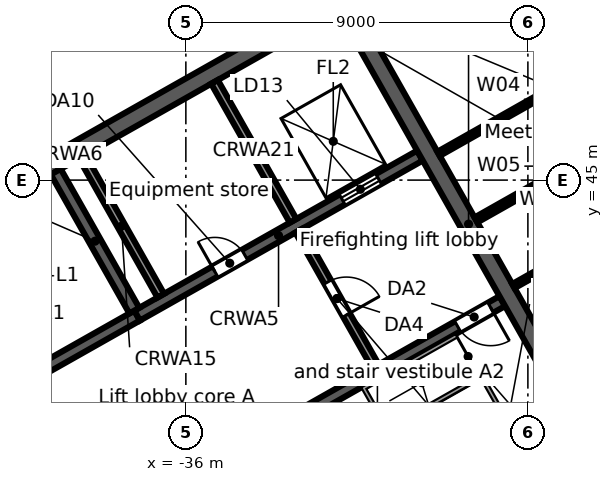
"""IFC4 building model, lengths in metres.
Left out: names, types, materials, properties, quantities, classifications, styles, units other than length and angle.
Written with IfcOpenShell. Run it as: python <this file> out.ifc"""

import sys

from ifc_helpers import new_model, si_unit, direction, frame, frame_2d, origin, place, context, subcontext, project, spatial, rectangle, extrude, element, fill, save


model = new_model("IFC4")
c1 = context("Model", 3, precision=1e-05, world=origin(), true_north=direction((0.0, 1.0)))
c2 = subcontext(c1, "Body", "Model", "MODEL_VIEW")
j1 = project(units=[si_unit("LENGTHUNIT", "METRE"), si_unit("PLANEANGLEUNIT", "RADIAN")], contexts=[c1])
p1 = place(None, origin())
s1 = spatial("IfcSite", under=j1, at=p1, CompositionType="ELEMENT")
p2 = place(p1, origin())
s2 = spatial("IfcBuilding", under=s1, at=p2, CompositionType="ELEMENT")
p3 = place(p2, frame((0.0, 0.0, 211.4)))
s3 = spatial("IfcBuildingStorey", under=s2, at=p3, CompositionType="ELEMENT", Elevation=211.4)
p4 = place(p3, frame((-0.046, 47.974, 0.0), z_axis=(0.0, 0.0, 1.0), x_axis=(-0.870356579543, -0.492421998337, 0.0)))
e1 = element("IfcWall", 1, at=p4, inside=s3, PredefinedType="STANDARD", context=c2, shape_type="SweptSolid", body=[
    extrude(rectangle(XDim=43.754, YDim=0.25, at=frame_2d((21.877, 0.0))), origin(), (0.0, 0.0, 1.0), 3.62),
])
p5 = place(p4, frame((41.061, 0.0, 0.8)))
e2 = element("IfcOpeningElement", 2, at=p5, cuts=e1, PredefinedType="OPENING", context=c2, shape_type="SweptSolid", body=[
    extrude(rectangle(XDim=2.4, YDim=2.2, at=frame_2d((1.2, 1.1))), frame((0.0, 0.135, 0.0), z_axis=(0.0, -1.0, 0.0), x_axis=(1.0, 0.0, 0.0)), (0.0, 0.0, 1.0), 0.27),
])
p6 = place(p4, frame((38.443, 0.0, 0.0)))
e3 = element("IfcOpeningElement", 3, at=p6, cuts=e1, PredefinedType="OPENING", context=c2, shape_type="SweptSolid", body=[
    extrude(rectangle(XDim=1.8, YDim=2.4, at=frame_2d((0.9, 1.2))), frame((0.0, 0.135, 0.0), z_axis=(0.0, -1.0, 0.0), x_axis=(1.0, 0.0, 0.0)), (0.0, 0.0, 1.0), 0.27),
])
p7 = place(p4, frame((35.225, 0.0, 0.8)))
e4 = element("IfcOpeningElement", 4, at=p7, cuts=e1, PredefinedType="OPENING", context=c2, shape_type="SweptSolid", body=[
    extrude(rectangle(XDim=2.4, YDim=2.2, at=frame_2d((1.2, 1.1))), frame((0.0, 0.135, 0.0), z_axis=(0.0, -1.0, 0.0), x_axis=(1.0, 0.0, 0.0)), (0.0, 0.0, 1.0), 0.27),
])
p8 = place(p4, frame((32.307, 0.0, 0.8)))
e5 = element("IfcOpeningElement", 5, at=p8, cuts=e1, PredefinedType="OPENING", context=c2, shape_type="SweptSolid", body=[
    extrude(rectangle(XDim=2.4, YDim=2.2, at=frame_2d((1.2, 1.1))), frame((0.0, 0.135, 0.0), z_axis=(0.0, -1.0, 0.0), x_axis=(1.0, 0.0, 0.0)), (0.0, 0.0, 1.0), 0.27),
])
p9 = place(p4, frame((29.688, 0.0, 0.0)))
e6 = element("IfcOpeningElement", 6, at=p9, cuts=e1, PredefinedType="OPENING", context=c2, shape_type="SweptSolid", body=[
    extrude(rectangle(XDim=1.8, YDim=2.4, at=frame_2d((0.9, 1.2))), frame((0.0, 0.135, 0.0), z_axis=(0.0, -1.0, 0.0), x_axis=(1.0, 0.0, 0.0)), (0.0, 0.0, 1.0), 0.27),
])
p10 = place(p4, frame((26.47, 0.0, 0.8)))
e7 = element("IfcOpeningElement", 7, at=p10, cuts=e1, PredefinedType="OPENING", context=c2, shape_type="SweptSolid", body=[
    extrude(rectangle(XDim=2.4, YDim=2.2, at=frame_2d((1.2, 1.1))), frame((0.0, 0.135, 0.0), z_axis=(0.0, -1.0, 0.0), x_axis=(1.0, 0.0, 0.0)), (0.0, 0.0, 1.0), 0.27),
])
p11 = place(p4, frame((23.552, 0.0, 0.8)))
e8 = element("IfcOpeningElement", 8, at=p11, cuts=e1, PredefinedType="OPENING", context=c2, shape_type="SweptSolid", body=[
    extrude(rectangle(XDim=2.4, YDim=2.2, at=frame_2d((1.2, 1.1))), frame((0.0, 0.135, 0.0), z_axis=(0.0, -1.0, 0.0), x_axis=(1.0, 0.0, 0.0)), (0.0, 0.0, 1.0), 0.27),
])
p12 = place(p4, frame((20.934, 0.0, 0.0)))
e9 = element("IfcOpeningElement", 9, at=p12, cuts=e1, PredefinedType="OPENING", context=c2, shape_type="SweptSolid", body=[
    extrude(rectangle(XDim=1.8, YDim=2.4, at=frame_2d((0.9, 1.2))), frame((0.0, 0.135, 0.0), z_axis=(0.0, -1.0, 0.0), x_axis=(1.0, 0.0, 0.0)), (0.0, 0.0, 1.0), 0.27),
])
p13 = place(p4, frame((17.716, 0.0, 0.8)))
e10 = element("IfcOpeningElement", 10, at=p13, cuts=e1, PredefinedType="OPENING", context=c2, shape_type="SweptSolid", body=[
    extrude(rectangle(XDim=2.4, YDim=2.2, at=frame_2d((1.2, 1.1))), frame((0.0, 0.135, 0.0), z_axis=(0.0, -1.0, 0.0), x_axis=(1.0, 0.0, 0.0)), (0.0, 0.0, 1.0), 0.27),
])
p14 = place(p4, frame((14.798, 0.0, 0.8)))
e11 = element("IfcOpeningElement", 11, at=p14, cuts=e1, PredefinedType="OPENING", context=c2, shape_type="SweptSolid", body=[
    extrude(rectangle(XDim=2.4, YDim=2.2, at=frame_2d((1.2, 1.1))), frame((0.0, 0.135, 0.0), z_axis=(0.0, -1.0, 0.0), x_axis=(1.0, 0.0, 0.0)), (0.0, 0.0, 1.0), 0.27),
])
p15 = place(p4, frame((12.179, 0.0, 0.0)))
e12 = element("IfcOpeningElement", 12, at=p15, cuts=e1, PredefinedType="OPENING", context=c2, shape_type="SweptSolid", body=[
    extrude(rectangle(XDim=1.8, YDim=2.4, at=frame_2d((0.9, 1.2))), frame((0.0, 0.135, 0.0), z_axis=(0.0, -1.0, 0.0), x_axis=(1.0, 0.0, 0.0)), (0.0, 0.0, 1.0), 0.27),
])
p16 = place(p4, frame((8.961, 0.0, 0.8)))
e13 = element("IfcOpeningElement", 13, at=p16, cuts=e1, PredefinedType="OPENING", context=c2, shape_type="SweptSolid", body=[
    extrude(rectangle(XDim=2.4, YDim=2.2, at=frame_2d((1.2, 1.1))), frame((0.0, 0.135, 0.0), z_axis=(0.0, -1.0, 0.0), x_axis=(1.0, 0.0, 0.0)), (0.0, 0.0, 1.0), 0.27),
])
p17 = place(p4, frame((6.043, 0.0, 0.8)))
e14 = element("IfcOpeningElement", 14, at=p17, cuts=e1, PredefinedType="OPENING", context=c2, shape_type="SweptSolid", body=[
    extrude(rectangle(XDim=2.4, YDim=2.2, at=frame_2d((1.2, 1.1))), frame((0.0, 0.135, 0.0), z_axis=(0.0, -1.0, 0.0), x_axis=(1.0, 0.0, 0.0)), (0.0, 0.0, 1.0), 0.27),
])
p18 = place(p4, frame((3.425, 0.0, 0.0)))
e15 = element("IfcOpeningElement", 15, at=p18, cuts=e1, PredefinedType="OPENING", context=c2, shape_type="SweptSolid", body=[
    extrude(rectangle(XDim=1.8, YDim=2.4, at=frame_2d((0.9, 1.2))), frame((0.0, 0.135, 0.0), z_axis=(0.0, -1.0, 0.0), x_axis=(1.0, 0.0, 0.0)), (0.0, 0.0, 1.0), 0.27),
])
p19 = place(p4, frame((0.207, 0.0, 0.8)))
e16 = element("IfcOpeningElement", 16, at=p19, cuts=e1, PredefinedType="OPENING", context=c2, shape_type="SweptSolid", body=[
    extrude(rectangle(XDim=2.4, YDim=2.2, at=frame_2d((1.2, 1.1))), frame((0.0, 0.135, 0.0), z_axis=(0.0, -1.0, 0.0), x_axis=(1.0, 0.0, 0.0)), (0.0, 0.0, 1.0), 0.27),
])
p20 = place(p3, frame((-58.732, 38.771, 0.0), z_axis=(0.0, 0.0, 1.0), x_axis=(0.870354824205, 0.492425100887, 0.0)))
e17 = element("IfcWall", 17, at=p20, inside=s3, PredefinedType="STANDARD", context=c2, shape_type="SweptSolid", body=[
    extrude(rectangle(XDim=64.006, YDim=0.25, at=frame_2d((32.003, 0.0))), origin(), (0.0, 0.0, 1.0), 3.62),
])
p21 = place(p20, frame((61.259, 0.0, 0.8)))
e18 = element("IfcOpeningElement", 18, at=p21, cuts=e17, PredefinedType="OPENING", context=c2, shape_type="SweptSolid", body=[
    extrude(rectangle(XDim=2.4, YDim=2.2, at=frame_2d((1.2, 1.1))), frame((0.0, 0.135, 0.0), z_axis=(0.0, -1.0, 0.0), x_axis=(1.0, 0.0, 0.0)), (0.0, 0.0, 1.0), 0.27),
])
p22 = place(p20, frame((58.216, 0.0, 0.8)))
e19 = element("IfcOpeningElement", 19, at=p22, cuts=e17, PredefinedType="OPENING", context=c2, shape_type="SweptSolid", body=[
    extrude(rectangle(XDim=2.4, YDim=2.2, at=frame_2d((1.2, 1.1))), frame((0.0, 0.135, 0.0), z_axis=(0.0, -1.0, 0.0), x_axis=(1.0, 0.0, 0.0)), (0.0, 0.0, 1.0), 0.27),
])
p23 = place(p20, frame((55.173, 0.0, 0.8)))
e20 = element("IfcOpeningElement", 20, at=p23, cuts=e17, PredefinedType="OPENING", context=c2, shape_type="SweptSolid", body=[
    extrude(rectangle(XDim=2.4, YDim=2.2, at=frame_2d((1.2, 1.1))), frame((0.0, 0.135, 0.0), z_axis=(0.0, -1.0, 0.0), x_axis=(1.0, 0.0, 0.0)), (0.0, 0.0, 1.0), 0.27),
])
p24 = place(p20, frame((52.129, 0.0, 0.8)))
e21 = element("IfcOpeningElement", 21, at=p24, cuts=e17, PredefinedType="OPENING", context=c2, shape_type="SweptSolid", body=[
    extrude(rectangle(XDim=2.4, YDim=2.2, at=frame_2d((1.2, 1.1))), frame((0.0, 0.135, 0.0), z_axis=(0.0, -1.0, 0.0), x_axis=(1.0, 0.0, 0.0)), (0.0, 0.0, 1.0), 0.27),
])
p25 = place(p20, frame((49.086, 0.0, 0.8)))
e22 = element("IfcOpeningElement", 22, at=p25, cuts=e17, PredefinedType="OPENING", context=c2, shape_type="SweptSolid", body=[
    extrude(rectangle(XDim=2.4, YDim=2.2, at=frame_2d((1.2, 1.1))), frame((0.0, 0.135, 0.0), z_axis=(0.0, -1.0, 0.0), x_axis=(1.0, 0.0, 0.0)), (0.0, 0.0, 1.0), 0.27),
])
p26 = place(p20, frame((46.043, 0.0, 0.8)))
e23 = element("IfcOpeningElement", 23, at=p26, cuts=e17, PredefinedType="OPENING", context=c2, shape_type="SweptSolid", body=[
    extrude(rectangle(XDim=2.4, YDim=2.2, at=frame_2d((1.2, 1.1))), frame((0.0, 0.135, 0.0), z_axis=(0.0, -1.0, 0.0), x_axis=(1.0, 0.0, 0.0)), (0.0, 0.0, 1.0), 0.27),
])
p27 = place(p20, frame((43.0, 0.0, 0.8)))
e24 = element("IfcOpeningElement", 24, at=p27, cuts=e17, PredefinedType="OPENING", context=c2, shape_type="SweptSolid", body=[
    extrude(rectangle(XDim=2.4, YDim=2.2, at=frame_2d((1.2, 1.1))), frame((0.0, 0.135, 0.0), z_axis=(0.0, -1.0, 0.0), x_axis=(1.0, 0.0, 0.0)), (0.0, 0.0, 1.0), 0.27),
])
p28 = place(p20, frame((39.956, 0.0, 0.8)))
e25 = element("IfcOpeningElement", 25, at=p28, cuts=e17, PredefinedType="OPENING", context=c2, shape_type="SweptSolid", body=[
    extrude(rectangle(XDim=2.4, YDim=2.2, at=frame_2d((1.2, 1.1))), frame((0.0, 0.135, 0.0), z_axis=(0.0, -1.0, 0.0), x_axis=(1.0, 0.0, 0.0)), (0.0, 0.0, 1.0), 0.27),
])
p29 = place(p20, frame((36.913, 0.0, 0.8)))
e26 = element("IfcOpeningElement", 26, at=p29, cuts=e17, PredefinedType="OPENING", context=c2, shape_type="SweptSolid", body=[
    extrude(rectangle(XDim=2.4, YDim=2.2, at=frame_2d((1.2, 1.1))), frame((0.0, 0.135, 0.0), z_axis=(0.0, -1.0, 0.0), x_axis=(1.0, 0.0, 0.0)), (0.0, 0.0, 1.0), 0.27),
])
p30 = place(p20, frame((33.87, 0.0, 0.8)))
e27 = element("IfcOpeningElement", 27, at=p30, cuts=e17, PredefinedType="OPENING", context=c2, shape_type="SweptSolid", body=[
    extrude(rectangle(XDim=2.4, YDim=2.2, at=frame_2d((1.2, 1.1))), frame((0.0, 0.135, 0.0), z_axis=(0.0, -1.0, 0.0), x_axis=(1.0, 0.0, 0.0)), (0.0, 0.0, 1.0), 0.27),
])
p31 = place(p20, frame((30.826, 0.0, 0.8)))
e28 = element("IfcOpeningElement", 28, at=p31, cuts=e17, PredefinedType="OPENING", context=c2, shape_type="SweptSolid", body=[
    extrude(rectangle(XDim=2.4, YDim=2.2, at=frame_2d((1.2, 1.1))), frame((0.0, 0.135, 0.0), z_axis=(0.0, -1.0, 0.0), x_axis=(1.0, 0.0, 0.0)), (0.0, 0.0, 1.0), 0.27),
])
p32 = place(p20, frame((27.783, 0.0, 0.8)))
e29 = element("IfcOpeningElement", 29, at=p32, cuts=e17, PredefinedType="OPENING", context=c2, shape_type="SweptSolid", body=[
    extrude(rectangle(XDim=2.4, YDim=2.2, at=frame_2d((1.2, 1.1))), frame((0.0, 0.135, 0.0), z_axis=(0.0, -1.0, 0.0), x_axis=(1.0, 0.0, 0.0)), (0.0, 0.0, 1.0), 0.27),
])
p33 = place(p20, frame((24.74, 0.0, 0.8)))
e30 = element("IfcOpeningElement", 30, at=p33, cuts=e17, PredefinedType="OPENING", context=c2, shape_type="SweptSolid", body=[
    extrude(rectangle(XDim=2.4, YDim=2.2, at=frame_2d((1.2, 1.1))), frame((0.0, 0.135, 0.0), z_axis=(0.0, -1.0, 0.0), x_axis=(1.0, 0.0, 0.0)), (0.0, 0.0, 1.0), 0.27),
])
p34 = place(p20, frame((21.696, 0.0, 0.8)))
e31 = element("IfcOpeningElement", 31, at=p34, cuts=e17, PredefinedType="OPENING", context=c2, shape_type="SweptSolid", body=[
    extrude(rectangle(XDim=2.4, YDim=2.2, at=frame_2d((1.2, 1.1))), frame((0.0, 0.135, 0.0), z_axis=(0.0, -1.0, 0.0), x_axis=(1.0, 0.0, 0.0)), (0.0, 0.0, 1.0), 0.27),
])
p35 = place(p20, frame((18.653, 0.0, 0.8)))
e32 = element("IfcOpeningElement", 32, at=p35, cuts=e17, PredefinedType="OPENING", context=c2, shape_type="SweptSolid", body=[
    extrude(rectangle(XDim=2.4, YDim=2.2, at=frame_2d((1.2, 1.1))), frame((0.0, 0.135, 0.0), z_axis=(0.0, -1.0, 0.0), x_axis=(1.0, 0.0, 0.0)), (0.0, 0.0, 1.0), 0.27),
])
p36 = place(p20, frame((15.61, 0.0, 0.8)))
e33 = element("IfcOpeningElement", 33, at=p36, cuts=e17, PredefinedType="OPENING", context=c2, shape_type="SweptSolid", body=[
    extrude(rectangle(XDim=2.4, YDim=2.2, at=frame_2d((1.2, 1.1))), frame((0.0, 0.135, 0.0), z_axis=(0.0, -1.0, 0.0), x_axis=(1.0, 0.0, 0.0)), (0.0, 0.0, 1.0), 0.27),
])
p37 = place(p20, frame((12.567, 0.0, 0.8)))
e34 = element("IfcOpeningElement", 34, at=p37, cuts=e17, PredefinedType="OPENING", context=c2, shape_type="SweptSolid", body=[
    extrude(rectangle(XDim=2.4, YDim=2.2, at=frame_2d((1.2, 1.1))), frame((0.0, 0.135, 0.0), z_axis=(0.0, -1.0, 0.0), x_axis=(1.0, 0.0, 0.0)), (0.0, 0.0, 1.0), 0.27),
])
p38 = place(p20, frame((9.523, 0.0, 0.8)))
e35 = element("IfcOpeningElement", 35, at=p38, cuts=e17, PredefinedType="OPENING", context=c2, shape_type="SweptSolid", body=[
    extrude(rectangle(XDim=2.4, YDim=2.2, at=frame_2d((1.2, 1.1))), frame((0.0, 0.135, 0.0), z_axis=(0.0, -1.0, 0.0), x_axis=(1.0, 0.0, 0.0)), (0.0, 0.0, 1.0), 0.27),
])
p39 = place(p20, frame((6.48, 0.0, 0.8)))
e36 = element("IfcOpeningElement", 36, at=p39, cuts=e17, PredefinedType="OPENING", context=c2, shape_type="SweptSolid", body=[
    extrude(rectangle(XDim=2.4, YDim=2.2, at=frame_2d((1.2, 1.1))), frame((0.0, 0.135, 0.0), z_axis=(0.0, -1.0, 0.0), x_axis=(1.0, 0.0, 0.0)), (0.0, 0.0, 1.0), 0.27),
])
p40 = place(p20, frame((3.437, 0.0, 0.8)))
e37 = element("IfcOpeningElement", 37, at=p40, cuts=e17, PredefinedType="OPENING", context=c2, shape_type="SweptSolid", body=[
    extrude(rectangle(XDim=2.4, YDim=2.2, at=frame_2d((1.2, 1.1))), frame((0.0, 0.135, 0.0), z_axis=(0.0, -1.0, 0.0), x_axis=(1.0, 0.0, 0.0)), (0.0, 0.0, 1.0), 0.27),
])
p41 = place(p20, frame((0.393, 0.0, 0.8)))
e38 = element("IfcOpeningElement", 38, at=p41, cuts=e17, PredefinedType="OPENING", context=c2, shape_type="SweptSolid", body=[
    extrude(rectangle(XDim=2.4, YDim=2.2, at=frame_2d((1.2, 1.1))), frame((0.0, 0.135, 0.0), z_axis=(0.0, -1.0, 0.0), x_axis=(1.0, 0.0, 0.0)), (0.0, 0.0, 1.0), 0.27),
])
p42 = place(p3, frame((-34.245, 38.097, 0.0), z_axis=(0.0, 0.0, 1.0), x_axis=(0.870360409231, 0.492415229297, 0.0)))
e39 = element("IfcWall", 39, at=p42, inside=s3, PredefinedType="SOLIDWALL", context=c2, shape_type="SweptSolid", body=[
    extrude(rectangle(XDim=7.55, YDim=0.3, at=frame_2d((3.775, 0.0))), origin(), (0.0, 0.0, 1.0), 3.62),
])
p43 = place(p42, frame((6.2, 0.0, 0.0)))
e40 = element("IfcOpeningElement", 40, at=p43, cuts=e39, PredefinedType="OPENING", context=c2, shape_type="SweptSolid", body=[
    extrude(rectangle(XDim=1.0, YDim=2.1, at=frame_2d((0.5, 1.05))), frame((0.0, 0.16, 0.0), z_axis=(0.0, -1.0, 0.0), x_axis=(1.0, 0.0, 0.0)), (0.0, 0.0, 1.0), 0.32),
])
p44 = place(p3, frame((-43.853, 37.717, 0.0), z_axis=(0.0, 0.0, 1.0), x_axis=(0.870360409231, 0.492415229297, 0.0)))
e41 = element("IfcWall", 41, at=p44, inside=s3, PredefinedType="SOLIDWALL", context=c2, shape_type="SweptSolid", body=[
    extrude(rectangle(XDim=7.55, YDim=0.3, at=frame_2d((3.775, 0.0))), origin(), (0.0, 0.0, 1.0), 3.62),
])
p45 = place(p44, frame((0.35, 0.0, 0.0)))
e42 = element("IfcOpeningElement", 42, at=p45, cuts=e41, PredefinedType="OPENING", context=c2, shape_type="SweptSolid", body=[
    extrude(rectangle(XDim=1.0, YDim=2.1, at=frame_2d((0.5, 1.05))), frame((0.0, 0.16, 0.0), z_axis=(0.0, -1.0, 0.0), x_axis=(1.0, 0.0, 0.0)), (0.0, 0.0, 1.0), 0.32),
])
p46 = place(p3, frame((-37.282, 41.435, 0.0), z_axis=(0.0, 0.0, 1.0), x_axis=(0.870352688754, 0.492428875248, 0.0)))
e43 = element("IfcWall", 43, at=p46, inside=s3, PredefinedType="SOLIDWALL", context=c2, shape_type="SweptSolid", body=[
    extrude(rectangle(XDim=8.55, YDim=0.3, at=frame_2d((4.275, 0.0))), origin(), (0.0, 0.0, 1.0), 3.62),
])
p47 = place(p46, frame((6.2, 0.0, 0.0)))
e44 = element("IfcOpeningElement", 44, at=p47, cuts=e43, PredefinedType="OPENING", context=c2, shape_type="SweptSolid", body=[
    extrude(rectangle(XDim=1.1, YDim=2.1, at=frame_2d((0.55, 1.05))), frame((0.0, 0.16, 0.0), z_axis=(0.0, -1.0, 0.0), x_axis=(1.0, 0.0, 0.0)), (0.0, 0.0, 1.0), 0.32),
])
p48 = place(p46, frame((2.35, 0.0, 0.0)))
e45 = element("IfcOpeningElement", 45, at=p48, cuts=e43, PredefinedType="OPENING", context=c2, shape_type="SweptSolid", body=[
    extrude(rectangle(XDim=0.9, YDim=2.1, at=frame_2d((0.45, 1.05))), frame((0.0, 0.16, 0.0), z_axis=(0.0, -1.0, 0.0), x_axis=(1.0, 0.0, 0.0)), (0.0, 0.0, 1.0), 0.32),
])
p49 = place(p3, frame((-46.498, 41.477, 0.0), z_axis=(0.0, 0.0, 1.0), x_axis=(0.870359753402, 0.492416388494, 0.0)))
e46 = element("IfcWall", 46, at=p49, inside=s3, PredefinedType="SOLIDWALL", context=c2, shape_type="SweptSolid", body=[
    extrude(rectangle(XDim=17.0, YDim=0.45, at=frame_2d((8.5, 0.0))), origin(), (0.0, 0.0, 1.0), 3.62),
])
p50 = place(p3, frame((-40.516, 39.433, 0.0), z_axis=(0.0, 0.0, 1.0), x_axis=(0.492453559952, -0.87033872216, 0.0)))
e47 = element("IfcWall", 47, at=p50, inside=s3, PredefinedType="PARTITIONING", context=c2, shape_type="SweptSolid", body=[
    extrude(rectangle(XDim=4.1, YDim=0.2, at=frame_2d((2.05, 0.0))), origin(), (0.0, 0.0, 1.0), 3.62),
])
p51 = place(p50, frame((1.55, 0.0, 0.0)))
e48 = element("IfcOpeningElement", 48, at=p51, cuts=e47, PredefinedType="OPENING", context=c2, shape_type="SweptSolid", body=[
    extrude(rectangle(XDim=1.0, YDim=2.1, at=frame_2d((0.5, 1.05))), frame((0.0, 0.11, 0.0), z_axis=(0.0, -1.0, 0.0), x_axis=(1.0, 0.0, 0.0)), (0.0, 0.0, 1.0), 0.22),
])
p52 = place(p3, frame((-39.424, 45.22, 0.0), z_axis=(0.0, 0.0, 1.0), x_axis=(0.492409653846, -0.870363563575, 0.0)))
e49 = element("IfcWall", 49, at=p52, inside=s3, PredefinedType="SOLIDWALL", context=c2, shape_type="SweptSolid", body=[
    extrude(rectangle(XDim=4.2, YDim=0.3, at=frame_2d((2.1, 0.0))), origin(), (0.0, 0.0, 1.0), 3.62),
])
p53 = place(p3, frame((-38.728, 45.615, 0.0), z_axis=(0.0, 0.0, 1.0), x_axis=(0.492409653846, -0.870363563575, 0.0)))
e50 = element("IfcWall", 50, at=p53, inside=s3, PredefinedType="SOLIDWALL", context=c2, shape_type="SweptSolid", body=[
    extrude(rectangle(XDim=4.2, YDim=0.2, at=frame_2d((2.1, 0.0))), origin(), (0.0, 0.0, 1.0), 3.62),
])
p54 = place(p3, frame((-33.031, 43.667, 0.0), z_axis=(0.0, 0.0, 1.0), x_axis=(0.492408451753, -0.87036424366, 0.0)))
e51 = element("IfcWall", 51, at=p54, inside=s3, PredefinedType="PARTITIONING", context=c2, shape_type="SweptSolid", body=[
    extrude(rectangle(XDim=4.1, YDim=0.2, at=frame_2d((2.05, 0.0))), origin(), (0.0, 0.0, 1.0), 3.62),
])
p55 = place(p54, frame((1.55, 0.0, 0.0)))
e52 = element("IfcOpeningElement", 52, at=p55, cuts=e51, PredefinedType="OPENING", context=c2, shape_type="SweptSolid", body=[
    extrude(rectangle(XDim=1.0, YDim=2.1, at=frame_2d((0.5, 1.05))), frame((0.0, 0.11, 0.0), z_axis=(0.0, -1.0, 0.0), x_axis=(1.0, 0.0, 0.0)), (0.0, 0.0, 1.0), 0.22),
])
p56 = place(p3, frame((-35.246, 47.584, 0.0), z_axis=(0.0, 0.0, 1.0), x_axis=(0.492409653846, -0.870363563575, 0.0)))
e53 = element("IfcWall", 53, at=p56, inside=s3, PredefinedType="SOLIDWALL", context=c2, shape_type="SweptSolid", body=[
    extrude(rectangle(XDim=4.2, YDim=0.2, at=frame_2d((2.1, 0.0))), origin(), (0.0, 0.0, 1.0), 3.62),
])
p57 = place(p3, frame((-31.787, 49.542, 0.0), z_axis=(0.0, 0.0, 1.0), x_axis=(0.492421378713, -0.870356930107, 0.0)))
e54 = element("IfcWall", 54, at=p57, inside=s3, PredefinedType="SOLIDWALL", context=c2, shape_type="SweptSolid", body=[
    extrude(rectangle(XDim=13.1, YDim=0.45, at=frame_2d((6.55, 0.0))), origin(), (0.0, 0.0, 1.0), 3.62),
])
p58 = place(p3, frame((-29.35, 45.692, 0.0), z_axis=(0.0, 0.0, 1.0), x_axis=(0.870294630003, 0.492531478169, 0.0)))
e55 = element("IfcWall", 55, at=p58, inside=s3, PredefinedType="PARTITIONING", context=c2, shape_type="SweptSolid", body=[
    extrude(rectangle(XDim=5.75, YDim=0.125, at=frame_2d((2.875, 0.0))), origin(), (0.0, 0.0, 1.0), 3.62),
])
p59 = place(p3, frame((-28.366, 43.952, 0.0), z_axis=(0.0, 0.0, 1.0), x_axis=(0.870398309195, 0.492348233825, 0.0)))
e56 = element("IfcWall", 56, at=p59, inside=s3, PredefinedType="PARTITIONING", context=c2, shape_type="SweptSolid", body=[
    extrude(rectangle(XDim=5.75, YDim=0.15, at=frame_2d((2.875, 0.0))), origin(), (0.0, 0.0, 1.0), 2.892),
])
p60 = place(p3, frame((-27.381, 42.211, 0.0), z_axis=(0.0, 0.0, 1.0), x_axis=(0.870388475779, 0.492365617434, 0.0)))
e57 = element("IfcWall", 57, at=p60, inside=s3, PredefinedType="PARTITIONING", context=c2, shape_type="SweptSolid", body=[
    extrude(rectangle(XDim=3.0, YDim=0.125, at=frame_2d((1.5, 0.0))), origin(), (0.0, 0.0, 1.0), 2.892),
])
p61 = place(p47, origin())
e58 = element("IfcDoor", 58, at=p61, inside=s3, OperationType="DOUBLE_DOOR_SLIDING", PredefinedType="DOOR", context=c2, shape_type="SweptSolid", body=[
    extrude(rectangle(XDim=1.1, YDim=2.1, at=frame_2d((0.55, 1.05))), frame((0.0, 0.025, 0.0), z_axis=(0.0, -1.0, 0.0), x_axis=(1.0, 0.0, 0.0)), (0.0, 0.0, 1.0), 0.05),
])
fill(e44, e58)
p62 = place(p43, frame((1.0, 0.0, 0.0), z_axis=(0.0, 0.0, 1.0), x_axis=(-1.0, 0.0, 0.0)))
e59 = element("IfcDoor", 59, at=p62, inside=s3, OperationType="SINGLE_SWING_LEFT", PredefinedType="DOOR", context=c2, shape_type="SweptSolid", body=[
    extrude(rectangle(XDim=1.0, YDim=2.1, at=frame_2d((0.5, 1.05))), frame((0.0, 0.025, 0.0), z_axis=(0.0, -1.0, 0.0), x_axis=(1.0, 0.0, 0.0)), (0.0, 0.0, 1.0), 0.05),
])
fill(e40, e59)
p63 = place(p55, origin())
e60 = element("IfcDoor", 60, at=p63, inside=s3, OperationType="SINGLE_SWING_RIGHT", PredefinedType="DOOR", context=c2, shape_type="SweptSolid", body=[
    extrude(rectangle(XDim=1.0, YDim=2.1, at=frame_2d((0.5, 1.05))), frame((0.0, 0.025, 0.0), z_axis=(0.0, -1.0, 0.0), x_axis=(1.0, 0.0, 0.0)), (0.0, 0.0, 1.0), 0.05),
])
fill(e52, e60)
p64 = place(p48, origin())
e61 = element("IfcDoor", 61, at=p64, inside=s3, OperationType="SINGLE_SWING_LEFT", PredefinedType="DOOR", context=c2, shape_type="SweptSolid", body=[
    extrude(rectangle(XDim=0.9, YDim=2.1, at=frame_2d((0.45, 1.05))), frame((0.0, 0.025, 0.0), z_axis=(0.0, -1.0, 0.0), x_axis=(1.0, 0.0, 0.0)), (0.0, 0.0, 1.0), 0.05),
])
fill(e45, e61)
save(model, sys.argv[1])
